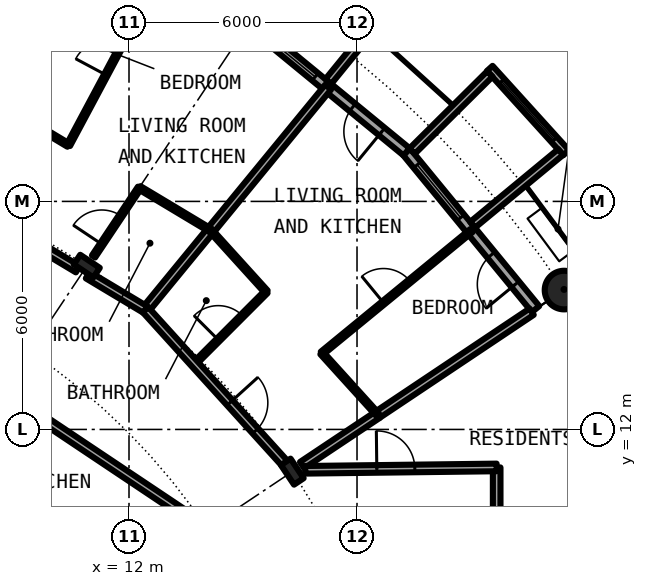
"""IFC4 building model, lengths in metres.
Left out: names, types, materials, properties, quantities, classifications, styles, units other than length and angle.
Written with IfcOpenShell. Run it as: python <this file> out.ifc"""

import sys

from ifc_helpers import new_model, si_unit, direction, frame, frame_2d, origin, origin_2d, place, context, subcontext, project, spatial, rectangle, circle, hollow_circle, i_section, extrude, element, fill, save


model = new_model("IFC4")
c1 = context("Model", 3, precision=1e-05, world=origin(), true_north=direction((0.0, 1.0)))
c2 = subcontext(c1, "Body", "Model", "MODEL_VIEW")
j1 = project(units=[si_unit("LENGTHUNIT", "METRE"), si_unit("PLANEANGLEUNIT", "RADIAN")], contexts=[c1])
p1 = place(None, origin())
s1 = spatial("IfcSite", under=j1, at=p1, CompositionType="ELEMENT")
p2 = place(p1, origin())
s2 = spatial("IfcBuilding", under=s1, at=p2, CompositionType="ELEMENT")
p3 = place(p2, frame((0.0, 0.0, 31.95)))
s3 = spatial("IfcBuildingStorey", under=s2, at=p3, CompositionType="ELEMENT", Elevation=31.95)
p4 = place(p3, frame((23.448, 15.667, 0.0), z_axis=(0.0, 0.0, 1.0), x_axis=(1.0, 0.0, 0.0)))
e1 = element("IfcColumn", 1, at=p4, inside=s3, PredefinedType="COLUMN", context=c2, shape_type="SweptSolid", body=[
    extrude(hollow_circle(Radius=0.508, WallThickness=0.05, at=origin_2d()), origin(), (0.0, 0.0, 1.0), 3.05),
])
for number, where, z_axis, x_axis in (
    (2, (16.297, 10.889, 0.0), (0.0, 0.0, 1.0), (0.831, 0.556, 0.0)),
    (3, (10.889, 16.297, 0.0), (0.0, 0.0, 1.0), (0.556, 0.831, 0.0)),
):
    element("IfcColumn", number, at=place(p3, frame(where, z_axis=z_axis, x_axis=x_axis)), inside=s3, PredefinedType="COLUMN", context=c2, shape_type="SweptSolid", body=[
        extrude(i_section(OverallWidth=0.305, OverallDepth=0.62, WebThickness=0.021, FlangeThickness=0.04, FilletRadius=0.027, at=origin_2d()), origin(), (0.0, 0.0, 1.0), 3.05),
    ])
p5 = place(p3, frame((22.699, 15.167, 0.0), z_axis=(0.0, 0.0, 1.0), x_axis=(-0.634382322723, 0.773019449054, 0.0)))
e4 = element("IfcWall", 4, at=p5, inside=s3, PredefinedType="SOLIDWALL", context=c2, shape_type="SweptSolid", body=[
    extrude(rectangle(XDim=5.352, YDim=0.25, at=frame_2d((2.676, 0.0))), origin(), (0.0, 0.0, 1.0), 2.7),
])
p6 = place(p5, frame((0.841, 0.0, 0.0)))
e5 = element("IfcOpeningElement", 5, at=p6, cuts=e4, PredefinedType="OPENING", context=c2, shape_type="SweptSolid", body=[
    extrude(rectangle(XDim=1.0, YDim=2.2, at=frame_2d((0.5, 1.1))), frame((0.0, 0.135, 0.0), z_axis=(0.0, -1.0, 0.0), x_axis=(1.0, 0.0, 0.0)), (0.0, 0.0, 1.0), 0.27),
])
p7 = place(p5, frame((3.111, 0.0, 0.3)))
e6 = element("IfcOpeningElement", 6, at=p7, cuts=e4, PredefinedType="OPENING", context=c2, shape_type="SweptSolid", body=[
    extrude(rectangle(XDim=1.8, YDim=2.1, at=frame_2d((0.9, 1.05))), frame((0.0, 0.135, 0.0), z_axis=(0.0, -1.0, 0.0), x_axis=(1.0, 0.0, 0.0)), (0.0, 0.0, 1.0), 0.27),
])
p8 = place(p3, frame((23.503, 19.282, -0.03), z_axis=(0.0, 0.0, 1.0), x_axis=(-0.671506829416, 0.740998365753, 0.0)))
e7 = element("IfcWall", 7, at=p8, inside=s3, PredefinedType="SOLIDWALL", context=c2, shape_type="SweptSolid", body=[
    extrude(rectangle(XDim=2.993, YDim=0.2, at=frame_2d((1.497, 0.0))), origin(), (0.0, 0.0, 1.0), 2.73),
])
p9 = place(p8, frame((0.457, 0.0, 0.33)))
e8 = element("IfcOpeningElement", 8, at=p9, cuts=e7, PredefinedType="OPENING", context=c2, shape_type="SweptSolid", body=[
    extrude(circle(Radius=1.04, at=frame_2d((1.04, 1.04))), frame((0.0, 0.11, 0.0), z_axis=(0.0, -1.0, 0.0), x_axis=(1.0, 0.0, 0.0)), (0.0, 0.0, 1.0), 0.22),
])
p10 = place(p3, frame((21.041, 17.384, -0.03), z_axis=(0.0, 0.0, 1.0), x_axis=(0.770784861449, 0.63709551667, 0.0)))
e9 = element("IfcWall", 9, at=p10, inside=s3, PredefinedType="SOLIDWALL", context=c2, shape_type="SweptSolid", body=[
    extrude(rectangle(XDim=3.006, YDim=0.2, at=frame_2d((1.503, 0.0))), origin(), (0.0, 0.0, 1.0), 2.73),
])
p11 = place(p3, frame((19.45, 19.323, -0.03), z_axis=(0.0, 0.0, 1.0), x_axis=(0.709727076896, 0.704476739375, 0.0)))
e10 = element("IfcWall", 10, at=p11, inside=s3, PredefinedType="SOLIDWALL", context=c2, shape_type="SweptSolid", body=[
    extrude(rectangle(XDim=2.883, YDim=0.2, at=frame_2d((1.441, 0.0))), origin(), (0.0, 0.0, 1.0), 2.73),
])
p12 = place(p3, frame((19.304, 19.304, 0.0), z_axis=(0.0, 0.0, 1.0), x_axis=(-0.773019449054, 0.634382322723, 0.0)))
e11 = element("IfcWall", 11, at=p12, inside=s3, PredefinedType="SOLIDWALL", context=c2, shape_type="SweptSolid", body=[
    extrude(rectangle(XDim=5.352, YDim=0.25, at=frame_2d((2.676, 0.0))), origin(), (0.0, 0.0, 1.0), 2.7),
])
p13 = place(p12, frame((0.841, 0.0, 0.0)))
e12 = element("IfcOpeningElement", 12, at=p13, cuts=e11, PredefinedType="OPENING", context=c2, shape_type="SweptSolid", body=[
    extrude(rectangle(XDim=1.0, YDim=2.2, at=frame_2d((0.5, 1.1))), frame((0.0, 0.135, 0.0), z_axis=(0.0, -1.0, 0.0), x_axis=(1.0, 0.0, 0.0)), (0.0, 0.0, 1.0), 0.27),
])
p14 = place(p12, frame((3.111, 0.0, 0.3)))
e13 = element("IfcOpeningElement", 13, at=p14, cuts=e11, PredefinedType="OPENING", context=c2, shape_type="SweptSolid", body=[
    extrude(rectangle(XDim=1.8, YDim=2.1, at=frame_2d((0.9, 1.05))), frame((0.0, 0.135, 0.0), z_axis=(0.0, -1.0, 0.0), x_axis=(1.0, 0.0, 0.0)), (0.0, 0.0, 1.0), 0.27),
])
p15 = place(p3, frame((17.246, 21.155, -0.03), z_axis=(0.0, 0.0, 1.0), x_axis=(0.631741648902, 0.775179004516, 0.0)))
e14 = element("IfcWall", 14, at=p15, inside=s3, PredefinedType="SOLIDWALL", context=c2, shape_type="SweptSolid", body=[
    extrude(rectangle(XDim=3.006, YDim=0.2, at=frame_2d((1.503, 0.0))), origin(), (0.0, 0.0, 1.0), 2.73),
])
p16 = place(p3, frame((21.675, 9.4, 0.0), z_axis=(0.0, 0.0, 1.0), x_axis=(0.0, 1.0, 0.0)))
e15 = element("IfcWall", 15, at=p16, inside=s3, PredefinedType="PARTITIONING", context=c2, shape_type="SweptSolid", body=[
    extrude(rectangle(XDim=1.6, YDim=0.2, at=frame_2d((0.8, 0.0))), origin(), (0.0, 0.0, 1.0), 2.7),
])
p17 = place(p3, frame((7.501, 18.108, 0.0), z_axis=(0.0, 0.0, 1.0), x_axis=(0.382490346157, 0.923959487801, 0.0)))
e16 = element("IfcWall", 16, at=p17, inside=s3, PredefinedType="PARTITIONING", context=c2, shape_type="SweptSolid", body=[
    extrude(rectangle(XDim=7.574, YDim=0.2, at=frame_2d((3.787, 0.0))), origin(), (0.0, 0.0, 1.0), 2.7),
])
p18 = place(p3, frame((10.405, 19.481, 0.0), z_axis=(0.0, 0.0, 1.0), x_axis=(0.471170755767, 0.882042016522, 0.0)))
e17 = element("IfcWall", 17, at=p18, inside=s3, PredefinedType="PARTITIONING", context=c2, shape_type="SweptSolid", body=[
    extrude(rectangle(XDim=5.089, YDim=0.1, at=frame_2d((2.545, 0.0))), origin(), (0.0, 0.0, 1.0), 2.7),
])
p19 = place(p18, frame((2.095, 0.0, 0.0)))
e18 = element("IfcOpeningElement", 18, at=p19, cuts=e17, PredefinedType="OPENING", context=c2, shape_type="SweptSolid", body=[
    extrude(rectangle(XDim=0.9, YDim=2.3, at=frame_2d((0.45, 1.15))), frame((0.0, 0.06, 0.0), z_axis=(0.0, -1.0, 0.0), x_axis=(1.0, 0.0, 0.0)), (0.0, 0.0, 1.0), 0.12),
])
p20 = place(p3, frame((11.067, 16.551, 0.0), z_axis=(0.0, 0.0, 1.0), x_axis=(0.55563200073, 0.831428337119, 0.0)))
e19 = element("IfcWall", 19, at=p20, inside=s3, PredefinedType="PARTITIONING", context=c2, shape_type="SweptSolid", body=[
    extrude(rectangle(XDim=2.176, YDim=0.1, at=frame_2d((1.088, 0.0))), origin(), (0.0, 0.0, 1.0), 2.7),
])
p21 = place(p20, frame((0.389, 0.0, 0.0)))
e20 = element("IfcOpeningElement", 20, at=p21, cuts=e19, PredefinedType="OPENING", context=c2, shape_type="SweptSolid", body=[
    extrude(rectangle(XDim=0.9, YDim=2.3, at=frame_2d((0.45, 1.15))), frame((0.0, 0.06, 0.0), z_axis=(0.0, -1.0, 0.0), x_axis=(1.0, 0.0, 0.0)), (0.0, 0.0, 1.0), 0.12),
])
p22 = place(p3, frame((12.434, 15.151, 0.0), z_axis=(0.0, 0.0, 1.0), x_axis=(0.634381303318, 0.773020285633, 0.0)))
e21 = element("IfcWall", 21, at=p22, inside=s3, PredefinedType="PARTITIONING", context=c2, shape_type="SweptSolid", body=[
    extrude(rectangle(XDim=7.576, YDim=0.2, at=frame_2d((3.788, 0.0))), origin(), (0.0, 0.0, 1.0), 2.7),
])
p23 = place(p3, frame((13.722, 13.73, 0.0), z_axis=(0.0, 0.0, 1.0), x_axis=(0.706741540154, 0.707471833659, 0.0)))
e22 = element("IfcWall", 22, at=p23, inside=s3, PredefinedType="PARTITIONING", context=c2, shape_type="SweptSolid", body=[
    extrude(rectangle(XDim=2.674, YDim=0.1, at=frame_2d((1.337, 0.0))), origin(), (0.0, 0.0, 1.0), 2.7),
])
p24 = place(p23, frame((0.887, 0.0, 0.0)))
e23 = element("IfcOpeningElement", 23, at=p24, cuts=e22, PredefinedType="OPENING", context=c2, shape_type="SweptSolid", body=[
    extrude(rectangle(XDim=0.9, YDim=2.3, at=frame_2d((0.45, 1.15))), frame((0.0, 0.06, 0.0), z_axis=(0.0, -1.0, 0.0), x_axis=(1.0, 0.0, 0.0)), (0.0, 0.0, 1.0), 0.12),
])
p25 = place(p3, frame((17.077, 14.006, 0.0), z_axis=(0.0, 0.0, 1.0), x_axis=(0.77326214499, 0.634086472908, 0.0)))
e24 = element("IfcWall", 24, at=p25, inside=s3, PredefinedType="PARTITIONING", context=c2, shape_type="SweptSolid", body=[
    extrude(rectangle(XDim=5.089, YDim=0.1, at=frame_2d((2.544, 0.0))), origin(), (0.0, 0.0, 1.0), 2.7),
])
p26 = place(p25, frame((2.094, 0.0, 0.0)))
e25 = element("IfcOpeningElement", 25, at=p26, cuts=e24, PredefinedType="OPENING", context=c2, shape_type="SweptSolid", body=[
    extrude(rectangle(XDim=0.9, YDim=2.3, at=frame_2d((0.45, 1.15))), frame((0.0, 0.06, 0.0), z_axis=(0.0, -1.0, 0.0), x_axis=(1.0, 0.0, 0.0)), (0.0, 0.0, 1.0), 0.12),
])
p27 = place(p3, frame((18.542, 12.389, 0.0), z_axis=(0.0, 0.0, 1.0), x_axis=(0.831387096605, 0.55569370664, 0.0)))
e26 = element("IfcWall", 26, at=p27, inside=s3, PredefinedType="PARTITIONING", context=c2, shape_type="SweptSolid", body=[
    extrude(rectangle(XDim=4.875, YDim=0.2, at=frame_2d((2.438, 0.0))), origin(), (0.0, 0.0, 1.0), 2.7),
])
p28 = place(p3, frame((16.555, 11.061, 0.0), z_axis=(0.0, 0.0, 1.0), x_axis=(0.832066006555, 0.554676627176, 0.0)))
e27 = element("IfcWall", 27, at=p28, inside=s3, PredefinedType="PARTITIONING", context=c2, shape_type="SweptSolid", body=[
    extrude(rectangle(XDim=2.39, YDim=0.2, at=frame_2d((1.195, 0.0))), origin(), (0.0, 0.0, 1.0), 2.7),
])
p29 = place(p3, frame((16.637, 10.938, 0.0), z_axis=(0.0, 0.0, 1.0), x_axis=(0.99992425795, 0.012307654658, 0.0)))
e28 = element("IfcWall", 28, at=p29, inside=s3, PredefinedType="PARTITIONING", context=c2, shape_type="SweptSolid", body=[
    extrude(rectangle(XDim=5.039, YDim=0.2, at=frame_2d((2.519, 0.0))), origin(), (0.0, 0.0, 1.0), 2.7),
])
p30 = place(p29, frame((1.884, 0.0, 0.0)))
e29 = element("IfcOpeningElement", 29, at=p30, cuts=e28, PredefinedType="OPENING", context=c2, shape_type="SweptSolid", body=[
    extrude(rectangle(XDim=1.0, YDim=2.3, at=frame_2d((0.5, 1.15))), frame((0.0, 0.11, 0.0), z_axis=(0.0, -1.0, 0.0), x_axis=(1.0, 0.0, 0.0)), (0.0, 0.0, 1.0), 0.22),
])
p31 = place(p3, frame((3.299, 16.574, 0.0), z_axis=(0.0, 0.0, 1.0), x_axis=(0.831465254975, -0.555576754166, 0.0)))
e30 = element("IfcWall", 30, at=p31, inside=s3, PredefinedType="PARTITIONING", context=c2, shape_type="SweptSolid", body=[
    extrude(rectangle(XDim=12.915, YDim=0.2, at=frame_2d((6.457, 0.0))), origin(), (0.0, 0.0, 1.0), 2.7),
])
p32 = place(p31, frame((4.346, 0.0, 0.0)))
e31 = element("IfcOpeningElement", 31, at=p32, cuts=e30, PredefinedType="OPENING", context=c2, shape_type="SweptSolid", body=[
    extrude(rectangle(XDim=1.0, YDim=2.3, at=frame_2d((0.5, 1.15))), frame((0.0, 0.11, 0.0), z_axis=(0.0, -1.0, 0.0), x_axis=(1.0, 0.0, 0.0)), (0.0, 0.0, 1.0), 0.22),
])
p33 = place(p3, frame((7.501, 18.108, 0.0), z_axis=(0.0, 0.0, 1.0), x_axis=(0.857656999296, -0.514222200569, 0.0)))
e32 = element("IfcWall", 32, at=p33, inside=s3, PredefinedType="PARTITIONING", context=c2, shape_type="SweptSolid", body=[
    extrude(rectangle(XDim=3.675, YDim=0.2, at=frame_2d((1.838, 0.0))), origin(), (0.0, 0.0, 1.0), 2.38),
])
p34 = place(p33, frame((1.418, 0.0, 0.0)))
e33 = element("IfcOpeningElement", 33, at=p34, cuts=e32, PredefinedType="OPENING", context=c2, shape_type="SweptSolid", body=[
    extrude(rectangle(XDim=1.0, YDim=2.3, at=frame_2d((0.5, 1.15))), frame((0.0, 0.11, 0.0), z_axis=(0.0, -1.0, 0.0), x_axis=(1.0, 0.0, 0.0)), (0.0, 0.0, 1.0), 0.22),
])
p35 = place(p3, frame((10.915, 16.061, 0.0), z_axis=(0.0, 0.0, 1.0), x_axis=(0.857809047014, -0.513968519329, 0.0)))
e34 = element("IfcWall", 34, at=p35, inside=s3, PredefinedType="PARTITIONING", context=c2, shape_type="SweptSolid", body=[
    extrude(rectangle(XDim=1.771, YDim=0.2, at=frame_2d((0.885, 0.0))), origin(), (0.0, 0.0, 1.0), 2.38),
])
p36 = place(p3, frame((12.434, 15.151, 0.0), z_axis=(0.0, 0.0, 1.0), x_axis=(0.671514934772, -0.740991020444, 0.0)))
e35 = element("IfcWall", 35, at=p36, inside=s3, PredefinedType="PARTITIONING", context=c2, shape_type="SweptSolid", body=[
    extrude(rectangle(XDim=5.598, YDim=0.2, at=frame_2d((2.799, 0.0))), origin(), (0.0, 0.0, 1.0), 2.38),
])
p37 = place(p36, frame((3.305, 0.0, 0.0)))
e36 = element("IfcOpeningElement", 36, at=p37, cuts=e35, PredefinedType="OPENING", context=c2, shape_type="SweptSolid", body=[
    extrude(rectangle(XDim=1.0, YDim=2.3, at=frame_2d((0.5, 1.15))), frame((0.0, 0.11, 0.0), z_axis=(0.0, -1.0, 0.0), x_axis=(1.0, 0.0, 0.0)), (0.0, 0.0, 1.0), 0.22),
])
for number, where, z_axis, x_axis in (
    (37, (8.534, 20.603, 0.0), (0.0, 0.0, 1.0), (0.858, -0.514, 0.0)),
    (38, (12.276, 18.359, 0.0), (0.0, 0.0, 1.0), (0.858, -0.514, 0.0)),
):
    element("IfcWall", number, at=place(p3, frame(where, z_axis=z_axis, x_axis=x_axis)), inside=s3, PredefinedType="PARTITIONING", context=c2, shape_type="SweptSolid", body=[
        extrude(rectangle(XDim=2.182, YDim=0.1, at=frame_2d((1.091, 0.0))), origin(), (0.0, 0.0, 1.0), 2.7),
    ])
p38 = place(p3, frame((14.147, 17.238, 0.0), z_axis=(0.0, 0.0, 1.0), x_axis=(0.671674967707, -0.740845960882, 0.0)))
e39 = element("IfcWall", 39, at=p38, inside=s3, PredefinedType="PARTITIONING", context=c2, shape_type="SweptSolid", body=[
    extrude(rectangle(XDim=2.181, YDim=0.1, at=frame_2d((1.091, 0.0))), origin(), (0.0, 0.0, 1.0), 2.7),
])
p39 = place(p3, frame((17.072, 14.011, 0.0), z_axis=(0.0, 0.0, 1.0), x_axis=(0.67169789574, -0.740825172937, 0.0)))
e40 = element("IfcWall", 40, at=p39, inside=s3, PredefinedType="PARTITIONING", context=c2, shape_type="SweptSolid", body=[
    extrude(rectangle(XDim=2.183, YDim=0.1, at=frame_2d((1.091, 0.0))), origin(), (0.0, 0.0, 1.0), 2.7),
])
p40 = place(p6, origin())
e41 = element("IfcDoor", 41, at=p40, inside=s3, OperationType="SINGLE_SWING_LEFT", PredefinedType="DOOR", context=c2, shape_type="SweptSolid", body=[
    extrude(rectangle(XDim=1.0, YDim=2.2, at=frame_2d((0.5, 1.1))), frame((0.0, 0.025, 0.0), z_axis=(0.0, -1.0, 0.0), x_axis=(1.0, 0.0, 0.0)), (0.0, 0.0, 1.0), 0.05),
])
fill(e5, e41)
p41 = place(p7, origin())
e42 = element("IfcWindow", 42, at=p41, inside=s3, PartitioningType="SINGLE_PANEL", PredefinedType="WINDOW", context=c2, shape_type="SweptSolid", body=[
    extrude(rectangle(XDim=1.8, YDim=2.1, at=frame_2d((0.9, 1.05))), frame((0.0, 0.03, 0.0), z_axis=(0.0, -1.0, 0.0), x_axis=(1.0, 0.0, 0.0)), (0.0, 0.0, 1.0), 0.06),
])
fill(e6, e42)
p42 = place(p9, origin())
e43 = element("IfcWindow", 43, at=p42, inside=s3, PartitioningType="SINGLE_PANEL", PredefinedType="WINDOW", context=c2, shape_type="SweptSolid", body=[
    extrude(circle(Radius=1.04, at=frame_2d((1.04, 1.04))), frame((0.0, 0.03, 0.0), z_axis=(0.0, -1.0, 0.0), x_axis=(1.0, 0.0, 0.0)), (0.0, 0.0, 1.0), 0.06),
])
fill(e8, e43)
p43 = place(p13, origin())
e44 = element("IfcDoor", 44, at=p43, inside=s3, OperationType="SINGLE_SWING_LEFT", PredefinedType="DOOR", context=c2, shape_type="SweptSolid", body=[
    extrude(rectangle(XDim=1.0, YDim=2.2, at=frame_2d((0.5, 1.1))), frame((0.0, 0.025, 0.0), z_axis=(0.0, -1.0, 0.0), x_axis=(1.0, 0.0, 0.0)), (0.0, 0.0, 1.0), 0.05),
])
fill(e12, e44)
p44 = place(p14, origin())
e45 = element("IfcWindow", 45, at=p44, inside=s3, PartitioningType="SINGLE_PANEL", PredefinedType="WINDOW", context=c2, shape_type="SweptSolid", body=[
    extrude(rectangle(XDim=1.8, YDim=2.1, at=frame_2d((0.9, 1.05))), frame((0.0, 0.03, 0.0), z_axis=(0.0, -1.0, 0.0), x_axis=(1.0, 0.0, 0.0)), (0.0, 0.0, 1.0), 0.06),
])
fill(e13, e45)
p45 = place(p37, origin())
e46 = element("IfcDoor", 46, at=p45, inside=s3, OperationType="SINGLE_SWING_RIGHT", PredefinedType="DOOR", context=c2, shape_type="SweptSolid", body=[
    extrude(rectangle(XDim=1.0, YDim=2.3, at=frame_2d((0.5, 1.15))), frame((0.0, 0.025, 0.0), z_axis=(0.0, -1.0, 0.0), x_axis=(1.0, 0.0, 0.0)), (0.0, 0.0, 1.0), 0.05),
])
fill(e36, e46)
p46 = place(p24, origin())
e47 = element("IfcDoor", 47, at=p46, inside=s3, OperationType="SINGLE_SWING_RIGHT", PredefinedType="DOOR", context=c2, shape_type="SweptSolid", body=[
    extrude(rectangle(XDim=0.9, YDim=2.3, at=frame_2d((0.45, 1.15))), frame((0.0, 0.025, 0.0), z_axis=(0.0, -1.0, 0.0), x_axis=(1.0, 0.0, 0.0)), (0.0, 0.0, 1.0), 0.05),
])
fill(e23, e47)
p47 = place(p26, origin())
e48 = element("IfcDoor", 48, at=p47, inside=s3, OperationType="SINGLE_SWING_RIGHT", PredefinedType="DOOR", context=c2, shape_type="SweptSolid", body=[
    extrude(rectangle(XDim=0.9, YDim=2.3, at=frame_2d((0.45, 1.15))), frame((0.0, 0.025, 0.0), z_axis=(0.0, -1.0, 0.0), x_axis=(1.0, 0.0, 0.0)), (0.0, 0.0, 1.0), 0.05),
])
fill(e25, e48)
p48 = place(p21, origin())
e49 = element("IfcDoor", 49, at=p48, inside=s3, OperationType="SINGLE_SWING_LEFT", PredefinedType="DOOR", context=c2, shape_type="SweptSolid", body=[
    extrude(rectangle(XDim=0.9, YDim=2.3, at=frame_2d((0.45, 1.15))), frame((0.0, 0.025, 0.0), z_axis=(0.0, -1.0, 0.0), x_axis=(1.0, 0.0, 0.0)), (0.0, 0.0, 1.0), 0.05),
])
fill(e20, e49)
p49 = place(p19, origin())
e50 = element("IfcDoor", 50, at=p49, inside=s3, OperationType="SINGLE_SWING_RIGHT", PredefinedType="DOOR", context=c2, shape_type="SweptSolid", body=[
    extrude(rectangle(XDim=0.9, YDim=2.3, at=frame_2d((0.45, 1.15))), frame((0.0, 0.025, 0.0), z_axis=(0.0, -1.0, 0.0), x_axis=(1.0, 0.0, 0.0)), (0.0, 0.0, 1.0), 0.05),
])
fill(e18, e50)
p50 = place(p30, origin())
e51 = element("IfcDoor", 51, at=p50, inside=s3, OperationType="SINGLE_SWING_LEFT", PredefinedType="DOOR", context=c2, shape_type="SweptSolid", body=[
    extrude(rectangle(XDim=1.0, YDim=2.3, at=frame_2d((0.5, 1.15))), frame((0.0, 0.025, 0.0), z_axis=(0.0, -1.0, 0.0), x_axis=(1.0, 0.0, 0.0)), (0.0, 0.0, 1.0), 0.05),
])
fill(e29, e51)
save(model, sys.argv[1])
